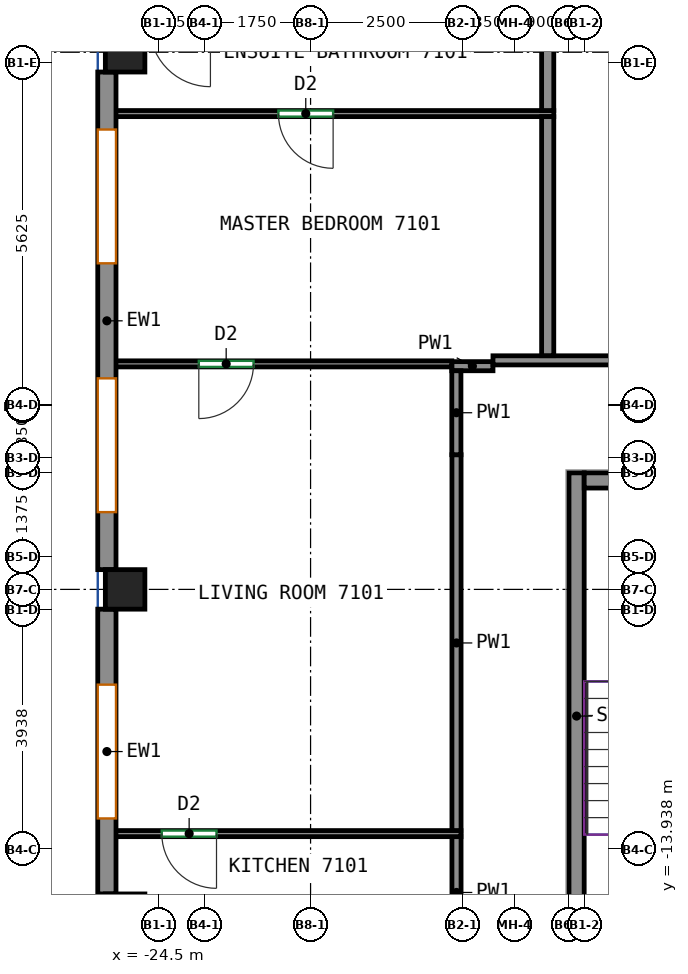
"""IFC4 building model, lengths in metres.
Left out: names, types, materials, properties, quantities, classifications, styles, units other than length and angle.
Written with IfcOpenShell. Run it as: python <this file> out.ifc"""

import sys

from ifc_helpers import new_model, si_unit, direction, frame, frame_2d, origin, origin_2d, place, context, subcontext, project, spatial, rectangle, extrude, source, transform, mapped, element, fill, save


model = new_model("IFC4")
c1 = context("Model", 3, precision=1e-05, world=origin(), true_north=direction((0.0, 1.0)))
c2 = subcontext(c1, "Body", "Model", "MODEL_VIEW")
j1 = project(units=[si_unit("LENGTHUNIT", "METRE"), si_unit("PLANEANGLEUNIT", "RADIAN")], contexts=[c1])
p1 = place(None, origin())
s1 = spatial("IfcSite", under=j1, at=p1, CompositionType="ELEMENT")
p2 = place(p1, origin())
s2 = spatial("IfcBuilding", under=s1, at=p2, CompositionType="ELEMENT")
p3 = place(p2, frame((0.0, 0.0, 287.4)))
s3 = spatial("IfcBuildingStorey", under=s2, at=p3, CompositionType="ELEMENT", Elevation=287.4)
m1 = source(origin(), c2, "Body", "SweptSolid", [
    extrude(rectangle(XDim=0.65, YDim=0.65, at=origin_2d()), origin(), (0.0, 0.0, 1.0), 3.0),
])
for number, where, z_axis, x_axis in (
    (1, (-25.05, -15.0, 0.0), (0.0, 0.0, 1.0), (1.0, 0.0, 0.0)),
    (2, (-25.05, -9.667, 0.0), (0.0, 0.0, 1.0), (1.0, 0.0, 0.0)),
    (3, (-25.05, -0.833, 0.0), (0.0, 0.0, 1.0), (1.0, 0.0, 0.0)),
):
    element("IfcColumn", number, at=place(p3, frame(where, z_axis=z_axis, x_axis=x_axis)), inside=s3, PredefinedType="COLUMN", context=c2, shape_type="MappedRepresentation", body=[
        mapped(m1, transform((0.0, 0.0, 0.0))),
    ])
m2 = source(origin(), c2, "Body", "SweptSolid", [
    extrude(rectangle(XDim=8.0, YDim=0.25, at=frame_2d((4.0, 0.0))), origin(), (0.0, 0.0, 1.0), 3.0),
])
p4 = place(p3, frame((-17.625, -15.75, 0.0), z_axis=(0.0, 0.0, 1.0), x_axis=(0.0, 1.0, 0.0)))
e4 = element("IfcWall", 4, at=p4, inside=s3, PredefinedType="SHEAR", context=c2, shape_type="MappedRepresentation", body=[
    mapped(m2, transform((0.0, 0.0, 0.0))),
])
m3 = source(origin(), c2, "Body", "SweptSolid", [
    extrude(rectangle(XDim=3.7, YDim=0.25, at=frame_2d((1.85, 0.0))), origin(), (0.0, 0.0, 1.0), 3.0),
])
p5 = place(p3, frame((-17.5, -7.875, 0.0), z_axis=(0.0, 0.0, 1.0), x_axis=(1.0, 0.0, 0.0)))
e5 = element("IfcWall", 5, at=p5, inside=s3, PredefinedType="SHEAR", context=c2, shape_type="MappedRepresentation", body=[
    mapped(m3, transform((0.0, 0.0, 0.0))),
])
m4 = source(origin(), c2, "Body", "SweptSolid", [
    extrude(rectangle(XDim=8.184, YDim=0.3, at=frame_2d((4.092, 0.0))), origin(), (0.0, 0.0, 1.0), 3.0),
])
p6 = place(p3, frame((-25.35, -1.158, 0.0), z_axis=(0.0, 0.0, 1.0), x_axis=(0.0, -1.0, 0.0)))
e6 = element("IfcWall", 6, at=p6, inside=s3, PredefinedType="SOLIDWALL", context=c2, shape_type="MappedRepresentation", body=[
    mapped(m4, transform((0.0, 0.0, 0.0))),
])
p7 = place(p6, frame((0.946, 0.0, 0.8)))
e7 = element("IfcOpeningElement", 7, at=p7, cuts=e6, PredefinedType="OPENING", context=c2, shape_type="SweptSolid", body=[
    extrude(rectangle(XDim=2.2, YDim=2.05, at=frame_2d((1.1, 1.025))), frame((0.0, 0.16, 0.0), z_axis=(0.0, -1.0, 0.0), x_axis=(1.0, 0.0, 0.0)), (0.0, 0.0, 1.0), 0.32),
])
p8 = place(p6, frame((5.038, 0.0, 0.8)))
e8 = element("IfcOpeningElement", 8, at=p8, cuts=e6, PredefinedType="OPENING", context=c2, shape_type="SweptSolid", body=[
    extrude(rectangle(XDim=2.2, YDim=2.05, at=frame_2d((1.1, 1.025))), frame((0.0, 0.16, 0.0), z_axis=(0.0, -1.0, 0.0), x_axis=(1.0, 0.0, 0.0)), (0.0, 0.0, 1.0), 0.32),
])
m5 = source(origin(), c2, "Body", "SweptSolid", [
    extrude(rectangle(XDim=4.683, YDim=0.3, at=frame_2d((2.342, 0.0))), origin(), (0.0, 0.0, 1.0), 3.0),
])
p9 = place(p3, frame((-25.35, -9.992, 0.0), z_axis=(0.0, 0.0, 1.0), x_axis=(0.0, -1.0, 0.0)))
e9 = element("IfcWall", 9, at=p9, inside=s3, PredefinedType="SOLIDWALL", context=c2, shape_type="MappedRepresentation", body=[
    mapped(m5, transform((0.0, 0.0, 0.0))),
])
p10 = place(p9, frame((1.242, 0.0, 0.8)))
e10 = element("IfcOpeningElement", 10, at=p10, cuts=e9, PredefinedType="OPENING", context=c2, shape_type="SweptSolid", body=[
    extrude(rectangle(XDim=2.2, YDim=2.05, at=frame_2d((1.1, 1.025))), frame((0.0, 0.16, 0.0), z_axis=(0.0, -1.0, 0.0), x_axis=(1.0, 0.0, 0.0)), (0.0, 0.0, 1.0), 0.32),
])
p11 = place(p3, frame((-19.6, -15.578, 0.0), z_axis=(0.0, 0.0, 1.0), x_axis=(0.0, 1.0, 0.0)))
e11 = element("IfcWall", 11, at=p11, inside=s3, PredefinedType="PARTITIONING", context=c2, shape_type="SweptSolid", body=[
    extrude(rectangle(XDim=1.855, YDim=0.15, at=frame_2d((0.927, 0.0))), origin(), (0.0, 0.0, 1.0), 3.0),
])
p12 = place(p3, frame((-19.0, -5.996, 0.0), z_axis=(0.0, 0.0, 1.0), x_axis=(-1.0, 0.0, 0.0)))
e12 = element("IfcWall", 12, at=p12, inside=s3, PredefinedType="PARTITIONING", context=c2, shape_type="SweptSolid", body=[
    extrude(rectangle(XDim=0.677, YDim=0.15, at=frame_2d((0.338, 0.0))), origin(), (0.0, 0.0, 1.0), 3.0),
])
p13 = place(p3, frame((-19.6, -13.643, 0.0), z_axis=(0.0, 0.0, 1.0), x_axis=(0.0, 1.0, 0.0)))
e13 = element("IfcWall", 13, at=p13, inside=s3, PredefinedType="PARTITIONING", context=c2, shape_type="SweptSolid", body=[
    extrude(rectangle(XDim=6.191, YDim=0.15, at=frame_2d((3.096, 0.0))), origin(), (0.0, 0.0, 1.0), 3.0),
])
p14 = place(p3, frame((-19.602, -7.452, 0.0), z_axis=(0.0, 0.0, 1.0), x_axis=(0.0, 1.0, 0.0)))
e14 = element("IfcWall", 14, at=p14, inside=s3, PredefinedType="PARTITIONING", context=c2, shape_type="SweptSolid", body=[
    extrude(rectangle(XDim=1.381, YDim=0.15, at=frame_2d((0.69, 0.0))), origin(), (0.0, 0.0, 1.0), 3.0),
])
p15 = place(p3, frame((-19.0, -5.9, 0.0), z_axis=(0.0, 0.0, 1.0), x_axis=(1.0, 0.0, 0.0)))
e15 = element("IfcWall", 15, at=p15, inside=s3, PredefinedType="PARTITIONING", context=c2, shape_type="SweptSolid", body=[
    extrude(rectangle(XDim=25.655, YDim=0.15, at=frame_2d((12.828, 0.0))), origin(), (0.0, 0.0, 1.0), 3.0),
])
p16 = place(p15, frame((6.697, 0.0, 0.0)))
e16 = element("IfcOpeningElement", 16, at=p16, cuts=e15, PredefinedType="OPENING", context=c2, shape_type="SweptSolid", body=[
    extrude(rectangle(XDim=0.9, YDim=2.1, at=frame_2d((0.45, 1.05))), frame((0.0, 0.085, 0.0), z_axis=(0.0, -1.0, 0.0), x_axis=(1.0, 0.0, 0.0)), (0.0, 0.0, 1.0), 0.17),
])
p17 = place(p3, frame((-19.527, -13.683, 0.0), z_axis=(0.0, 0.0, 1.0), x_axis=(-1.0, 0.0, 0.0)))
e17 = element("IfcWall", 17, at=p17, inside=s3, PredefinedType="PARTITIONING", context=c2, shape_type="SweptSolid", body=[
    extrude(rectangle(XDim=5.723, YDim=0.1, at=frame_2d((2.861, 0.0))), origin(), (0.0, 0.0, 1.0), 3.0),
])
p18 = place(p17, frame((4.02, 0.0, 0.0)))
e18 = element("IfcOpeningElement", 18, at=p18, cuts=e17, PredefinedType="OPENING", context=c2, shape_type="SweptSolid", body=[
    extrude(rectangle(XDim=0.9, YDim=2.1, at=frame_2d((0.45, 1.05))), frame((0.0, 0.06, 0.0), z_axis=(0.0, -1.0, 0.0), x_axis=(1.0, 0.0, 0.0)), (0.0, 0.0, 1.0), 0.12),
])
p19 = place(p3, frame((-19.677, -5.958, 0.0), z_axis=(0.0, 0.0, 1.0), x_axis=(-1.0, 0.0, 0.0)))
e19 = element("IfcWall", 19, at=p19, inside=s3, PredefinedType="PARTITIONING", context=c2, shape_type="SweptSolid", body=[
    extrude(rectangle(XDim=5.573, YDim=0.1, at=frame_2d((2.787, 0.0))), origin(), (0.0, 0.0, 1.0), 3.0),
])
p20 = place(p19, frame((3.261, 0.0, 0.0)))
e20 = element("IfcOpeningElement", 20, at=p20, cuts=e19, PredefinedType="OPENING", context=c2, shape_type="SweptSolid", body=[
    extrude(rectangle(XDim=0.9, YDim=2.1, at=frame_2d((0.45, 1.05))), frame((0.0, 0.06, 0.0), z_axis=(0.0, -1.0, 0.0), x_axis=(1.0, 0.0, 0.0)), (0.0, 0.0, 1.0), 0.12),
])
p21 = place(p3, frame((-18.0, -1.842, 0.0), z_axis=(0.0, 0.0, 1.0), x_axis=(-1.0, 0.0, 0.0)))
e21 = element("IfcWall", 21, at=p21, inside=s3, PredefinedType="PARTITIONING", context=c2, shape_type="SweptSolid", body=[
    extrude(rectangle(XDim=7.25, YDim=0.1, at=frame_2d((3.625, 0.0))), origin(), (0.0, 0.0, 1.0), 3.0),
])
p22 = place(p21, frame((3.629, 0.0, 0.0)))
e22 = element("IfcOpeningElement", 22, at=p22, cuts=e21, PredefinedType="OPENING", context=c2, shape_type="SweptSolid", body=[
    extrude(rectangle(XDim=0.9, YDim=2.1, at=frame_2d((0.45, 1.05))), frame((0.0, 0.06, 0.0), z_axis=(0.0, -1.0, 0.0), x_axis=(1.0, 0.0, 0.0)), (0.0, 0.0, 1.0), 0.12),
])
p23 = place(p3, frame((-18.1, -5.823, 0.0), z_axis=(0.0, 0.0, 1.0), x_axis=(0.0, 1.0, 0.0)))
e23 = element("IfcWall", 23, at=p23, inside=s3, PredefinedType="PARTITIONING", context=c2, shape_type="SweptSolid", body=[
    extrude(rectangle(XDim=3.931, YDim=0.2, at=frame_2d((1.965, 0.0))), origin(), (0.0, 0.0, 1.0), 3.0),
])
p24 = place(p3, frame((-18.1, -1.792, 0.0), z_axis=(0.0, 0.0, 1.0), x_axis=(0.0, 1.0, 0.0)))
e24 = element("IfcWall", 24, at=p24, inside=s3, PredefinedType="PARTITIONING", context=c2, shape_type="SweptSolid", body=[
    extrude(rectangle(XDim=1.342, YDim=0.2, at=frame_2d((0.671, 0.0))), origin(), (0.0, 0.0, 1.0), 3.0),
])
p25 = place(p7, origin())
e25 = element("IfcWindow", 25, at=p25, inside=s3, PartitioningType="SINGLE_PANEL", PredefinedType="WINDOW", context=c2, shape_type="SweptSolid", body=[
    extrude(rectangle(XDim=2.2, YDim=2.05, at=frame_2d((1.1, 1.025))), frame((0.0, 0.03, 0.0), z_axis=(0.0, -1.0, 0.0), x_axis=(1.0, 0.0, 0.0)), (0.0, 0.0, 1.0), 0.06),
])
fill(e7, e25)
p26 = place(p8, origin())
e26 = element("IfcWindow", 26, at=p26, inside=s3, PartitioningType="SINGLE_PANEL", PredefinedType="WINDOW", context=c2, shape_type="SweptSolid", body=[
    extrude(rectangle(XDim=2.2, YDim=2.05, at=frame_2d((1.1, 1.025))), frame((0.0, 0.03, 0.0), z_axis=(0.0, -1.0, 0.0), x_axis=(1.0, 0.0, 0.0)), (0.0, 0.0, 1.0), 0.06),
])
fill(e8, e26)
p27 = place(p10, origin())
e27 = element("IfcWindow", 27, at=p27, inside=s3, PartitioningType="SINGLE_PANEL", PredefinedType="WINDOW", context=c2, shape_type="SweptSolid", body=[
    extrude(rectangle(XDim=2.2, YDim=2.05, at=frame_2d((1.1, 1.025))), frame((0.0, 0.03, 0.0), z_axis=(0.0, -1.0, 0.0), x_axis=(1.0, 0.0, 0.0)), (0.0, 0.0, 1.0), 0.06),
])
fill(e10, e27)
p28 = place(p18, origin())
e28 = element("IfcDoor", 28, at=p28, inside=s3, OperationType="SINGLE_SWING_LEFT", PredefinedType="DOOR", context=c2, shape_type="SweptSolid", body=[
    extrude(rectangle(XDim=0.9, YDim=2.1, at=frame_2d((0.45, 1.05))), frame((0.0, 0.025, 0.0), z_axis=(0.0, -1.0, 0.0), x_axis=(1.0, 0.0, 0.0)), (0.0, 0.0, 1.0), 0.05),
])
fill(e18, e28)
p29 = place(p20, origin())
e29 = element("IfcDoor", 29, at=p29, inside=s3, OperationType="SINGLE_SWING_RIGHT", PredefinedType="DOOR", context=c2, shape_type="SweptSolid", body=[
    extrude(rectangle(XDim=0.9, YDim=2.1, at=frame_2d((0.45, 1.05))), frame((0.0, 0.025, 0.0), z_axis=(0.0, -1.0, 0.0), x_axis=(1.0, 0.0, 0.0)), (0.0, 0.0, 1.0), 0.05),
])
fill(e20, e29)
p30 = place(p22, origin())
e30 = element("IfcDoor", 30, at=p30, inside=s3, OperationType="SINGLE_SWING_LEFT", PredefinedType="DOOR", context=c2, shape_type="SweptSolid", body=[
    extrude(rectangle(XDim=0.9, YDim=2.1, at=frame_2d((0.45, 1.05))), frame((0.0, 0.025, 0.0), z_axis=(0.0, -1.0, 0.0), x_axis=(1.0, 0.0, 0.0)), (0.0, 0.0, 1.0), 0.05),
])
fill(e22, e30)
save(model, sys.argv[1])
